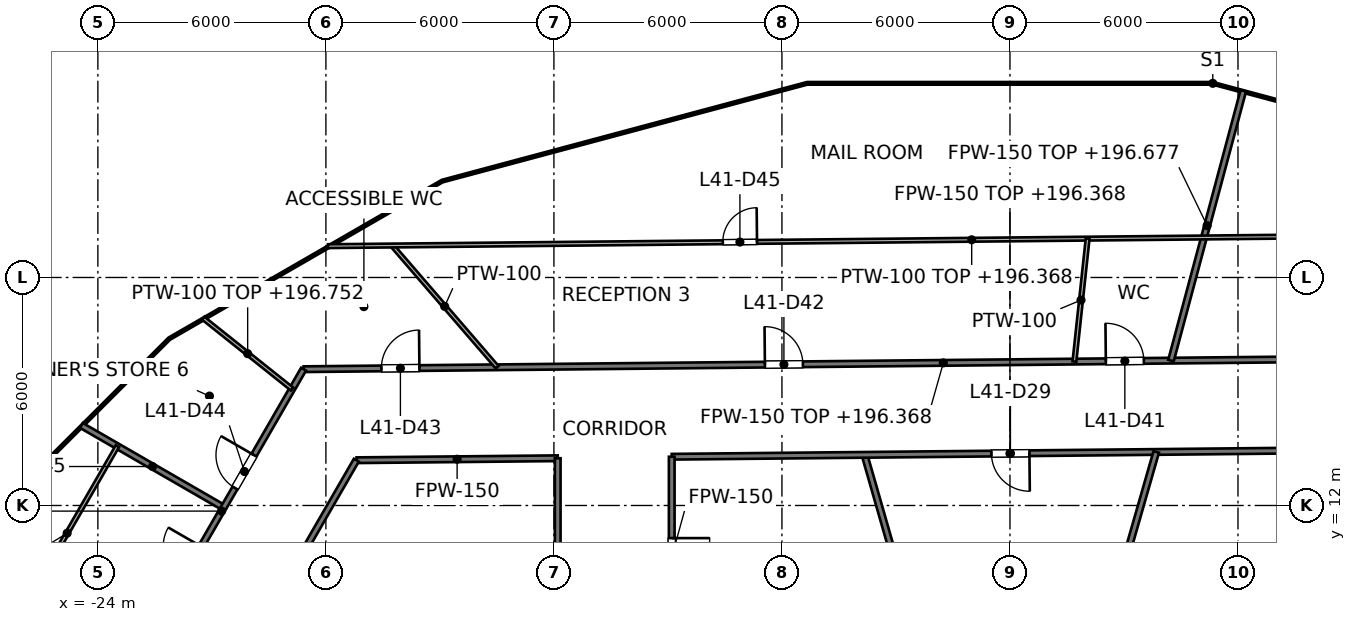
"""IFC4 building model, lengths in metres.
Left out: names, types, materials, properties, quantities, classifications, styles, units other than length and angle.
Written with IfcOpenShell. Run it as: python <this file> out.ifc"""

import sys

from ifc_helpers import new_model, si_unit, direction, frame, frame_2d, origin, place, context, subcontext, project, spatial, rectangle, extrude, element, fill, save


model = new_model("IFC4")
c1 = context("Model", 3, precision=1e-05, world=origin(), true_north=direction((0.0, 1.0)))
c2 = subcontext(c1, "Body", "Model", "MODEL_VIEW")
j1 = project(units=[si_unit("LENGTHUNIT", "METRE"), si_unit("PLANEANGLEUNIT", "RADIAN")], contexts=[c1])
p1 = place(None, origin())
s1 = spatial("IfcSite", under=j1, at=p1, CompositionType="ELEMENT")
p2 = place(p1, origin())
s2 = spatial("IfcBuilding", under=s1, at=p2, CompositionType="ELEMENT")
p3 = place(p2, frame((0.0, 0.0, 193.6)))
s3 = spatial("IfcBuildingStorey", under=s2, at=p3, CompositionType="ELEMENT", Elevation=193.6)
p4 = place(p3, frame((-3.827, 13.333, 0.0), z_axis=(0.0, 0.0, 1.0), x_axis=(0.275935525478, -0.961176147113, 0.0)))
e1 = element("IfcWall", 1, at=p4, inside=s3, PredefinedType="PARTITIONING", context=c2, shape_type="SweptSolid", body=[
    extrude(rectangle(XDim=5.548, YDim=0.15, at=frame_2d((2.774, 0.0))), origin(), (0.0, 0.0, 1.0), 3.7),
])
p5 = place(p3, frame((-24.433, 14.106, 0.0), z_axis=(0.0, 0.0, 1.0), x_axis=(0.866048255864, -0.499960416948, 0.0)))
e2 = element("IfcWall", 2, at=p5, inside=s3, PredefinedType="PARTITIONING", context=c2, shape_type="SweptSolid", body=[
    extrude(rectangle(XDim=4.322, YDim=0.15, at=frame_2d((2.161, 0.0))), origin(), (0.0, 0.0, 1.0), 2.845),
])
p6 = place(p3, frame((-17.194, 13.191, 0.0), z_axis=(0.0, 0.0, 1.0), x_axis=(0.999950853109, 0.009914200296, 0.0)))
e3 = element("IfcWall", 3, at=p6, inside=s3, PredefinedType="PARTITIONING", context=c2, shape_type="SweptSolid", body=[
    extrude(rectangle(XDim=5.294, YDim=0.15, at=frame_2d((2.647, 0.0))), origin(), (0.0, 0.0, 1.0), 2.777),
])
p7 = place(p3, frame((-8.9, 13.282, 0.0), z_axis=(0.0, 0.0, 1.0), x_axis=(0.999951241216, 0.009874977968, 0.0)))
e4 = element("IfcWall", 4, at=p7, inside=s3, PredefinedType="PARTITIONING", context=c2, shape_type="SweptSolid", body=[
    extrude(rectangle(XDim=17.801, YDim=0.15, at=frame_2d((8.9, 0.0))), origin(), (0.0, 0.0, 1.0), 2.768),
])
p8 = place(p7, frame((8.413, 0.0, 0.0)))
e5 = element("IfcOpeningElement", 5, at=p8, cuts=e4, PredefinedType="OPENING", context=c2, shape_type="SweptSolid", body=[
    extrude(rectangle(XDim=1.0, YDim=2.1, at=frame_2d((0.5, 1.05))), frame((0.0, 0.075, 0.0), z_axis=(0.0, -1.0, 0.0), x_axis=(1.0, 0.0, 0.0)), (0.0, 0.0, 1.0), 0.15),
])
p9 = place(p3, frame((-18.587, 15.586, 0.0), z_axis=(0.0, 0.0, 1.0), x_axis=(0.999951300332, 0.009868989991, 0.0)))
e6 = element("IfcWall", 6, at=p9, inside=s3, PredefinedType="PARTITIONING", context=c2, shape_type="SweptSolid", body=[
    extrude(rectangle(XDim=33.669, YDim=0.15, at=frame_2d((16.834, 0.0))), origin(), (0.0, 0.0, 1.0), 2.768),
])
p10 = place(p9, frame((27.749, 0.0, 0.0)))
e7 = element("IfcOpeningElement", 7, at=p10, cuts=e6, PredefinedType="OPENING", context=c2, shape_type="SweptSolid", body=[
    extrude(rectangle(XDim=1.0, YDim=2.1, at=frame_2d((0.5, 1.05))), frame((0.0, 0.075, 0.0), z_axis=(0.0, -1.0, 0.0), x_axis=(1.0, 0.0, 0.0)), (0.0, 0.0, 1.0), 0.15),
])
p11 = place(p9, frame((21.111, 0.0, 0.0)))
e8 = element("IfcOpeningElement", 8, at=p11, cuts=e6, PredefinedType="OPENING", context=c2, shape_type="SweptSolid", body=[
    extrude(rectangle(XDim=1.0, YDim=2.1, at=frame_2d((0.5, 1.05))), frame((0.0, 0.075, 0.0), z_axis=(0.0, -1.0, 0.0), x_axis=(1.0, 0.0, 0.0)), (0.0, 0.0, 1.0), 0.15),
])
p12 = place(p9, frame((12.139, 0.0, 0.0)))
e9 = element("IfcOpeningElement", 9, at=p12, cuts=e6, PredefinedType="OPENING", context=c2, shape_type="SweptSolid", body=[
    extrude(rectangle(XDim=1.0, YDim=2.1, at=frame_2d((0.5, 1.05))), frame((0.0, 0.075, 0.0), z_axis=(0.0, -1.0, 0.0), x_axis=(1.0, 0.0, 0.0)), (0.0, 0.0, 1.0), 0.15),
])
p13 = place(p9, frame((2.048, 0.0, 0.0)))
e10 = element("IfcOpeningElement", 10, at=p13, cuts=e6, PredefinedType="OPENING", context=c2, shape_type="SweptSolid", body=[
    extrude(rectangle(XDim=1.0, YDim=2.1, at=frame_2d((0.5, 1.05))), frame((0.0, 0.075, 0.0), z_axis=(0.0, -1.0, 0.0), x_axis=(1.0, 0.0, 0.0)), (0.0, 0.0, 1.0), 0.15),
])
p14 = place(p3, frame((-20.5, 7.474, 0.0), z_axis=(0.0, 0.0, 1.0), x_axis=(0.499957196903, 0.866050114754, 0.0)))
e11 = element("IfcWall", 11, at=p14, inside=s3, PredefinedType="PARTITIONING", context=c2, shape_type="SweptSolid", body=[
    extrude(rectangle(XDim=6.602, YDim=0.15, at=frame_2d((3.301, 0.0))), origin(), (0.0, 0.0, 1.0), 2.777),
])
p15 = place(p14, frame((2.802, 0.0, 0.0)))
e12 = element("IfcOpeningElement", 12, at=p15, cuts=e11, PredefinedType="OPENING", context=c2, shape_type="SweptSolid", body=[
    extrude(rectangle(XDim=1.0, YDim=2.1, at=frame_2d((0.5, 1.05))), frame((0.0, 0.075, 0.0), z_axis=(0.0, -1.0, 0.0), x_axis=(1.0, 0.0, 0.0)), (0.0, 0.0, 1.0), 0.15),
])
p16 = place(p3, frame((-22.9, 8.117, 0.0), z_axis=(0.0, 0.0, 1.0), x_axis=(0.499950307977, 0.866054091587, 0.0)))
e13 = element("IfcWall", 13, at=p16, inside=s3, PredefinedType="PARTITIONING", context=c2, shape_type="SweptSolid", body=[
    extrude(rectangle(XDim=8.626, YDim=0.15, at=frame_2d((4.313, 0.0))), origin(), (0.0, 0.0, 1.0), 2.777),
])
p17 = place(p16, frame((5.015, 0.0, 0.0)))
e14 = element("IfcOpeningElement", 14, at=p17, cuts=e13, PredefinedType="OPENING", context=c2, shape_type="SweptSolid", body=[
    extrude(rectangle(XDim=1.0, YDim=2.1, at=frame_2d((0.5, 1.05))), frame((0.0, 0.075, 0.0), z_axis=(0.0, -1.0, 0.0), x_axis=(1.0, 0.0, 0.0)), (0.0, 0.0, 1.0), 0.15),
])
p18 = place(p16, frame((2.237, 0.0, 0.0)))
e15 = element("IfcOpeningElement", 15, at=p18, cuts=e13, PredefinedType="OPENING", context=c2, shape_type="SweptSolid", body=[
    extrude(rectangle(XDim=1.0, YDim=2.1, at=frame_2d((0.5, 1.05))), frame((0.0, 0.075, 0.0), z_axis=(0.0, -1.0, 0.0), x_axis=(1.0, 0.0, 0.0)), (0.0, 0.0, 1.0), 0.15),
])
p19 = place(p3, frame((2.296, 8.0, 0.0), z_axis=(0.0, 0.0, 1.0), x_axis=(0.275958345059, 0.961169595749, 0.0)))
e16 = element("IfcWall", 16, at=p19, inside=s3, PredefinedType="PARTITIONING", context=c2, shape_type="SweptSolid", body=[
    extrude(rectangle(XDim=5.628, YDim=0.15, at=frame_2d((2.814, 0.0))), origin(), (0.0, 0.0, 1.0), 3.7),
])
p20 = place(p3, frame((4.237, 15.813, 0.0), z_axis=(0.0, 0.0, 1.0), x_axis=(0.258799155252, 0.965931155539, 0.0)))
e17 = element("IfcWall", 17, at=p20, inside=s3, PredefinedType="PARTITIONING", context=c2, shape_type="SweptSolid", body=[
    extrude(rectangle(XDim=7.353, YDim=0.15, at=frame_2d((3.676, 0.0))), origin(), (0.0, 0.0, 1.0), 3.077),
])
p21 = place(p3, frame((-8.9, 8.0, 0.0), z_axis=(0.0, 0.0, 1.0), x_axis=(0.0, 1.0, 0.0)))
e18 = element("IfcWall", 18, at=p21, inside=s3, PredefinedType="PARTITIONING", context=c2, shape_type="SweptSolid", body=[
    extrude(rectangle(XDim=5.283, YDim=0.15, at=frame_2d((2.642, 0.0))), origin(), (0.0, 0.0, 1.0), 2.777),
])
p22 = place(p21, frame((2.142, 0.0, 0.0)))
e19 = element("IfcOpeningElement", 19, at=p22, cuts=e18, PredefinedType="OPENING", context=c2, shape_type="SweptSolid", body=[
    extrude(rectangle(XDim=1.0, YDim=2.1, at=frame_2d((0.5, 1.05))), frame((0.0, 0.075, 0.0), z_axis=(0.0, -1.0, 0.0), x_axis=(1.0, 0.0, 0.0)), (0.0, 0.0, 1.0), 0.15),
])
p23 = place(p3, frame((-11.9, 8.0, 0.0), z_axis=(0.0, 0.0, 1.0), x_axis=(0.0, 1.0, 0.0)))
e20 = element("IfcWall", 20, at=p23, inside=s3, PredefinedType="PARTITIONING", context=c2, shape_type="SweptSolid", body=[
    extrude(rectangle(XDim=5.243, YDim=0.15, at=frame_2d((2.622, 0.0))), origin(), (0.0, 0.0, 1.0), 2.777),
])
p24 = place(p3, frame((-16.257, 18.841, 0.0), z_axis=(0.0, 0.0, 1.0), x_axis=(0.653325359449, -0.757077258079, 0.0)))
e21 = element("IfcWall", 21, at=p24, inside=s3, PredefinedType="PARTITIONING", context=c2, shape_type="SweptSolid", body=[
    extrude(rectangle(XDim=4.231, YDim=0.1, at=frame_2d((2.115, 0.0))), origin(), (0.0, 0.0, 1.0), 3.7),
])
p25 = place(p3, frame((-21.228, 16.928, 0.0), z_axis=(0.0, 0.0, 1.0), x_axis=(0.781894831851, -0.623410355966, 0.0)))
e22 = element("IfcWall", 22, at=p25, inside=s3, PredefinedType="PARTITIONING", context=c2, shape_type="SweptSolid", body=[
    extrude(rectangle(XDim=2.992, YDim=0.1, at=frame_2d((1.496, 0.0))), origin(), (0.0, 0.0, 1.0), 3.152),
])
p26 = place(p3, frame((-17.945, 18.824, 0.0), z_axis=(0.0, 0.0, 1.0), x_axis=(0.999950833273, 0.009916200716, 0.0)))
e23 = element("IfcWall", 23, at=p26, inside=s3, PredefinedType="PARTITIONING", context=c2, shape_type="SweptSolid", body=[
    extrude(rectangle(XDim=33.878, YDim=0.1, at=frame_2d((16.939, 0.0))), origin(), (0.0, 0.0, 1.0), 2.768),
])
p27 = place(p26, frame((27.964, 0.0, 0.0)))
e24 = element("IfcOpeningElement", 24, at=p27, cuts=e23, PredefinedType="OPENING", context=c2, shape_type="SweptSolid", body=[
    extrude(rectangle(XDim=0.9, YDim=2.1, at=frame_2d((0.45, 1.05))), frame((0.0, 0.05, 0.0), z_axis=(0.0, -1.0, 0.0), x_axis=(1.0, 0.0, 0.0)), (0.0, 0.0, 1.0), 0.1),
])
p28 = place(p26, frame((10.39, 0.0, 0.0)))
e25 = element("IfcOpeningElement", 25, at=p28, cuts=e23, PredefinedType="OPENING", context=c2, shape_type="SweptSolid", body=[
    extrude(rectangle(XDim=0.9, YDim=2.1, at=frame_2d((0.45, 1.05))), frame((0.0, 0.05, 0.0), z_axis=(0.0, -1.0, 0.0), x_axis=(1.0, 0.0, 0.0)), (0.0, 0.0, 1.0), 0.1),
])
p29 = place(p3, frame((-26.13, 8.983, 0.0), z_axis=(0.0, 0.0, 1.0), x_axis=(0.500063643593, 0.865988656021, 0.0)))
e26 = element("IfcWall", 26, at=p29, inside=s3, PredefinedType="PARTITIONING", context=c2, shape_type="SweptSolid", body=[
    extrude(rectangle(XDim=5.285, YDim=0.1, at=frame_2d((2.643, 0.0))), origin(), (0.0, 0.0, 1.0), 2.845),
])
p30 = place(p3, frame((1.696, 15.788, 0.0), z_axis=(0.0, 0.0, 1.0), x_axis=(0.106930547304, 0.994266492472, 0.0)))
e27 = element("IfcWall", 27, at=p30, inside=s3, PredefinedType="PARTITIONING", context=c2, shape_type="SweptSolid", body=[
    extrude(rectangle(XDim=3.253, YDim=0.1, at=frame_2d((1.627, 0.0))), origin(), (0.0, 0.0, 1.0), 3.7),
])
p31 = place(p8, origin())
e28 = element("IfcDoor", 28, at=p31, inside=s3, OperationType="SINGLE_SWING_RIGHT", PredefinedType="DOOR", context=c2, shape_type="SweptSolid", body=[
    extrude(rectangle(XDim=1.0, YDim=2.1, at=frame_2d((0.5, 1.05))), frame((0.0, 0.025, 0.0), z_axis=(0.0, -1.0, 0.0), x_axis=(1.0, 0.0, 0.0)), (0.0, 0.0, 1.0), 0.05),
])
fill(e5, e28)
p32 = place(p22, origin())
e29 = element("IfcDoor", 29, at=p32, inside=s3, OperationType="SINGLE_SWING_RIGHT", PredefinedType="DOOR", context=c2, shape_type="SweptSolid", body=[
    extrude(rectangle(XDim=1.0, YDim=2.1, at=frame_2d((0.5, 1.05))), frame((0.0, 0.025, 0.0), z_axis=(0.0, -1.0, 0.0), x_axis=(1.0, 0.0, 0.0)), (0.0, 0.0, 1.0), 0.05),
])
fill(e19, e29)
p33 = place(p11, origin())
e30 = element("IfcDoor", 30, at=p33, inside=s3, OperationType="SINGLE_SWING_LEFT", PredefinedType="DOOR", context=c2, shape_type="SweptSolid", body=[
    extrude(rectangle(XDim=1.0, YDim=2.1, at=frame_2d((0.5, 1.05))), frame((0.0, 0.025, 0.0), z_axis=(0.0, -1.0, 0.0), x_axis=(1.0, 0.0, 0.0)), (0.0, 0.0, 1.0), 0.05),
])
fill(e8, e30)
p34 = place(p12, origin())
e31 = element("IfcDoor", 31, at=p34, inside=s3, OperationType="SINGLE_SWING_LEFT", PredefinedType="DOOR", context=c2, shape_type="SweptSolid", body=[
    extrude(rectangle(XDim=1.0, YDim=2.1, at=frame_2d((0.5, 1.05))), frame((0.0, 0.025, 0.0), z_axis=(0.0, -1.0, 0.0), x_axis=(1.0, 0.0, 0.0)), (0.0, 0.0, 1.0), 0.05),
])
fill(e9, e31)
p35 = place(p13, origin())
e32 = element("IfcDoor", 32, at=p35, inside=s3, OperationType="SINGLE_SWING_RIGHT", PredefinedType="DOOR", context=c2, shape_type="SweptSolid", body=[
    extrude(rectangle(XDim=1.0, YDim=2.1, at=frame_2d((0.5, 1.05))), frame((0.0, 0.025, 0.0), z_axis=(0.0, -1.0, 0.0), x_axis=(1.0, 0.0, 0.0)), (0.0, 0.0, 1.0), 0.05),
])
fill(e10, e32)
p36 = place(p17, origin())
e33 = element("IfcDoor", 33, at=p36, inside=s3, OperationType="SINGLE_SWING_RIGHT", PredefinedType="DOOR", context=c2, shape_type="SweptSolid", body=[
    extrude(rectangle(XDim=1.0, YDim=2.1, at=frame_2d((0.5, 1.05))), frame((0.0, 0.025, 0.0), z_axis=(0.0, -1.0, 0.0), x_axis=(1.0, 0.0, 0.0)), (0.0, 0.0, 1.0), 0.05),
])
fill(e14, e33)
p37 = place(p28, origin())
e34 = element("IfcDoor", 34, at=p37, inside=s3, OperationType="SINGLE_SWING_RIGHT", PredefinedType="DOOR", context=c2, shape_type="SweptSolid", body=[
    extrude(rectangle(XDim=0.9, YDim=2.1, at=frame_2d((0.45, 1.05))), frame((0.0, 0.025, 0.0), z_axis=(0.0, -1.0, 0.0), x_axis=(1.0, 0.0, 0.0)), (0.0, 0.0, 1.0), 0.05),
])
fill(e25, e34)
save(model, sys.argv[1])
